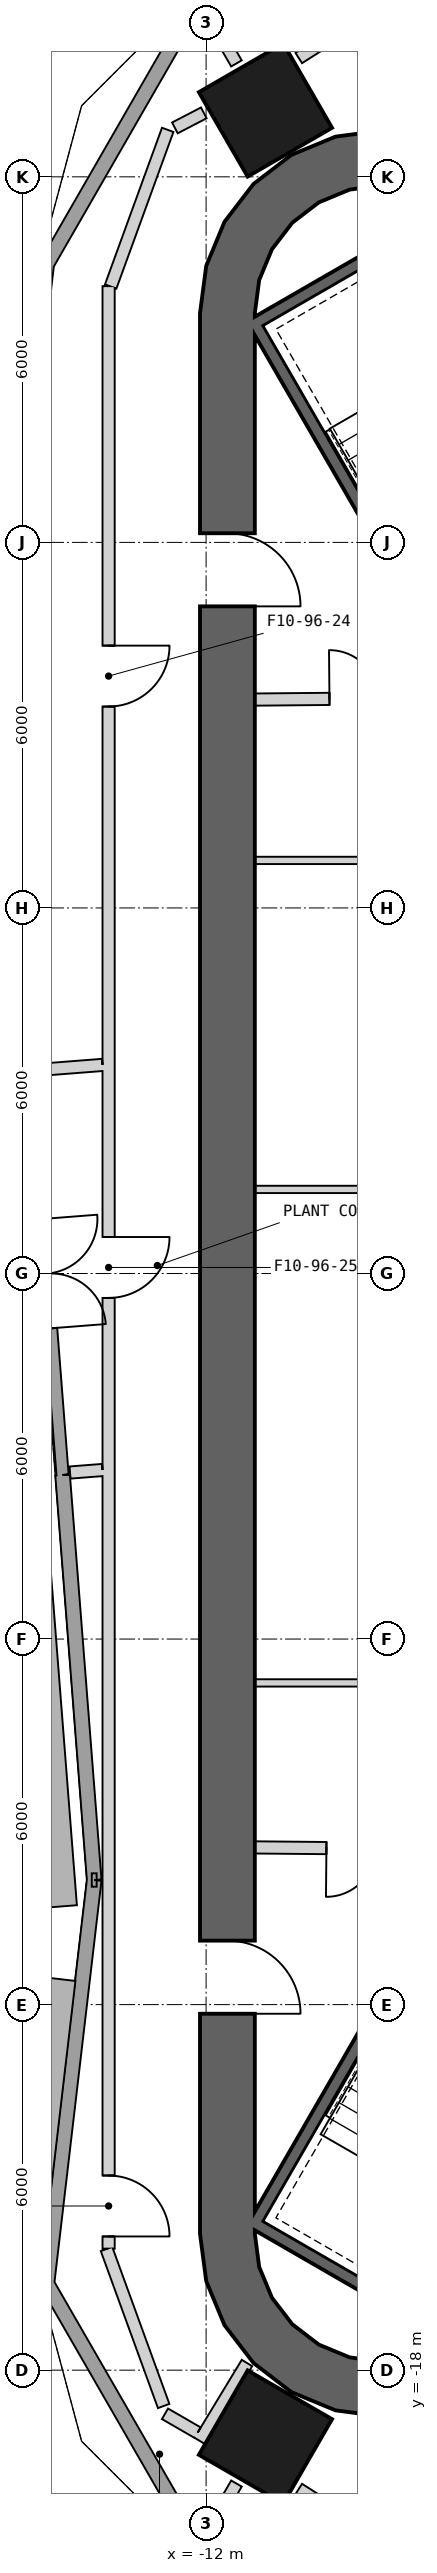
"""IFC4 building model, lengths in metres.
Left out: names, types, materials, properties, quantities, classifications, styles, units other than length and angle.
Written with IfcOpenShell. Run it as: python <this file> out.ifc"""

import sys

from ifc_helpers import new_model, si_unit, direction, frame, frame_2d, origin, origin_2d, place, context, subcontext, project, spatial, polyline, rectangle, outline, extrude, element, fill, save


model = new_model("IFC4")
c1 = context("Model", 3, precision=1e-05, world=origin(), true_north=direction((0.0, 1.0)))
c2 = subcontext(c1, "Body", "Model", "MODEL_VIEW")
j1 = project(units=[si_unit("LENGTHUNIT", "METRE"), si_unit("PLANEANGLEUNIT", "RADIAN")], contexts=[c1])
p1 = place(None, origin())
s1 = spatial("IfcSite", under=j1, at=p1, CompositionType="ELEMENT")
p2 = place(p1, origin())
s2 = spatial("IfcBuilding", under=s1, at=p2, CompositionType="ELEMENT")
p3 = place(p2, frame((0.0, 0.0, 425.3)))
s3 = spatial("IfcBuildingStorey", under=s2, at=p3, CompositionType="ELEMENT", Elevation=425.3)
for number, where, z_axis, x_axis in (
    (1, (-11.025, 19.097, -0.25), (0.0, 0.0, 1.0), (-0.5, 0.866, 0.0)),
    (2, (-11.025, -19.097, -0.25), (0.0, 0.0, 1.0), (-0.5, -0.866, 0.0)),
):
    element("IfcColumn", number, at=place(p3, frame(where, z_axis=z_axis, x_axis=x_axis)), inside=s3, PredefinedType="COLUMN", context=c2, shape_type="SweptSolid", body=[
        extrude(rectangle(XDim=1.6, YDim=1.6, at=origin_2d()), origin(), (0.0, 0.0, 1.0), 5.25),
    ])
p4 = place(p3, frame((-11.65, 15.762, 0.0), z_axis=(0.0, 0.0, 1.0), x_axis=(0.0, -1.0, 0.0)))
e3 = element("IfcWall", 3, at=p4, inside=s3, PredefinedType="SHEAR", context=c2, shape_type="SweptSolid", body=[
    extrude(rectangle(XDim=31.523, YDim=0.9, at=frame_2d((15.762, 0.0))), origin(), (0.0, 0.0, 1.0), 5.0),
])
p5 = place(p4, frame((3.612, 0.0, 0.0)))
e4 = element("IfcOpeningElement", 4, at=p5, cuts=e3, PredefinedType="OPENING", context=c2, shape_type="SweptSolid", body=[
    extrude(rectangle(XDim=1.2, YDim=2.4, at=frame_2d((0.6, 1.2))), frame((0.0, 0.46, 0.0), z_axis=(0.0, -1.0, 0.0), x_axis=(1.0, 0.0, 0.0)), (0.0, 0.0, 1.0), 0.92),
])
p6 = place(p4, frame((26.712, 0.0, 0.0)))
e5 = element("IfcOpeningElement", 5, at=p6, cuts=e3, PredefinedType="OPENING", context=c2, shape_type="SweptSolid", body=[
    extrude(rectangle(XDim=1.2, YDim=2.4, at=frame_2d((0.6, 1.2))), frame((0.0, 0.46, 0.0), z_axis=(0.0, -1.0, 0.0), x_axis=(1.0, 0.0, 0.0)), (0.0, 0.0, 1.0), 0.92),
])
p7 = place(p3, origin())
e6 = element("IfcWall", 6, at=p7, inside=s3, PredefinedType="SHEAR", context=c2, shape_type="SweptSolid", body=[
    extrude(outline(polyline([(-7.6, 18.36), (-8.323, 18.659), (-9.1, 18.762), (-9.876, 18.659), (-10.6, 18.36), (-11.221, 17.883), (-11.698, 17.262), (-11.998, 16.538), (-12.1, 15.762), (-11.2, 15.762), (-11.128, 16.305), (-10.919, 16.812), (-10.585, 17.247), (-10.15, 17.58), (-9.644, 17.79), (-9.1, 17.862), (-8.556, 17.79), (-8.05, 17.58), (-7.6, 18.36)])), origin(), (0.0, 0.0, 1.0), 5.0),
])
p8 = place(p3, origin())
e7 = element("IfcWall", 7, at=p8, inside=s3, PredefinedType="SHEAR", context=c2, shape_type="SweptSolid", body=[
    extrude(outline(polyline([(-12.1, -15.762), (-11.998, -16.538), (-11.698, -17.262), (-11.221, -17.883), (-10.6, -18.36), (-9.876, -18.659), (-9.1, -18.762), (-8.323, -18.659), (-7.6, -18.36), (-8.05, -17.58), (-8.556, -17.79), (-9.1, -17.862), (-9.644, -17.79), (-10.15, -17.58), (-10.585, -17.247), (-10.919, -16.812), (-11.128, -16.305), (-11.2, -15.762), (-12.1, -15.762)])), origin(), (0.0, 0.0, 1.0), 5.0),
])
p9 = place(p3, frame((-12.094, 20.946, 0.0), z_axis=(0.0, 0.0, 1.0), x_axis=(-0.498950155725, -0.866630683799, 0.0)))
e8 = element("IfcWall", 8, at=p9, inside=s3, PredefinedType="SOLIDWALL", context=c2, shape_type="SweptSolid", body=[
    extrude(rectangle(XDim=5.055, YDim=0.24, at=frame_2d((2.527, 0.0))), origin(), (0.0, 0.0, 1.0), 4.75),
])
p10 = place(p3, frame((-14.616, 16.565, 0.0), z_axis=(0.0, 0.0, 1.0), x_axis=(-0.11631164826, -0.993212766973, 0.0)))
e9 = element("IfcWall", 9, at=p10, inside=s3, PredefinedType="SOLIDWALL", context=c2, shape_type="SweptSolid", body=[
    extrude(rectangle(XDim=6.66, YDim=0.24, at=frame_2d((3.33, 0.0))), origin(), (0.0, 0.0, 1.0), 4.75),
])
p11 = place(p3, frame((-14.355, -3.307, 0.0), z_axis=(0.0, 0.0, 1.0), x_axis=(0.07783308516, -0.996966404075, 0.0)))
e10 = element("IfcWall", 10, at=p11, inside=s3, PredefinedType="SOLIDWALL", context=c2, shape_type="SweptSolid", body=[
    extrude(rectangle(XDim=6.669, YDim=0.24, at=frame_2d((3.334, 0.0))), origin(), (0.0, 0.0, 1.0), 4.75),
])
p12 = place(p3, frame((-13.836, -9.955, 0.0), z_axis=(0.0, 0.0, 1.0), x_axis=(-0.116299625297, -0.993214174867, 0.0)))
e11 = element("IfcWall", 11, at=p12, inside=s3, PredefinedType="SOLIDWALL", context=c2, shape_type="SweptSolid", body=[
    extrude(rectangle(XDim=6.669, YDim=0.24, at=frame_2d((3.334, 0.0))), origin(), (0.0, 0.0, 1.0), 4.75),
])
p13 = place(p3, frame((-14.612, -16.579, 0.0), z_axis=(0.0, 0.0, 1.0), x_axis=(0.499577110492, -0.866269421527, 0.0)))
e12 = element("IfcWall", 12, at=p13, inside=s3, PredefinedType="SOLIDWALL", context=c2, shape_type="SweptSolid", body=[
    extrude(rectangle(XDim=5.041, YDim=0.24, at=frame_2d((2.521, 0.0))), origin(), (0.0, 0.0, 1.0), 4.75),
])
p14 = place(p3, frame((-14.871, 3.302, 0.0), z_axis=(0.0, 0.0, 1.0), x_axis=(0.07782303262, -0.996967188825, 0.0)))
e13 = element("IfcWall", 13, at=p14, inside=s3, PredefinedType="SOLIDWALL", context=c2, shape_type="SweptSolid", body=[
    extrude(rectangle(XDim=6.629, YDim=0.2, at=frame_2d((3.314, 0.0))), origin(), (0.0, 0.0, 1.0), 4.75),
])
p15 = place(p14, frame((2.414, 0.0, 0.0)))
e14 = element("IfcOpeningElement", 14, at=p15, cuts=e13, PredefinedType="OPENING", context=c2, shape_type="SweptSolid", body=[
    extrude(rectangle(XDim=1.8, YDim=2.4, at=frame_2d((0.9, 1.2))), frame((0.0, 0.11, 0.0), z_axis=(0.0, -1.0, 0.0), x_axis=(1.0, 0.0, 0.0)), (0.0, 0.0, 1.0), 0.22),
])
p16 = place(p3, frame((-15.098, -17.603, 0.04), z_axis=(0.0, 0.0, 1.0), x_axis=(0.116308472351, 0.993213138888, 0.0)))
e15 = element("IfcWall", 15, at=p16, inside=s3, PredefinedType="PARAPET", context=c2, shape_type="SweptSolid", body=[
    extrude(rectangle(XDim=6.062, YDim=0.5, at=frame_2d((3.031, 0.0))), origin(), (0.0, 0.0, 1.0), 0.6),
])
p17 = place(p3, frame((-14.37, -10.388, 0.04), z_axis=(0.0, 0.0, 1.0), x_axis=(-0.077848108656, 0.996965231078, 0.0)))
e16 = element("IfcWall", 16, at=p17, inside=s3, PredefinedType="PARAPET", context=c2, shape_type="SweptSolid", body=[
    extrude(rectangle(XDim=20.799, YDim=0.5, at=frame_2d((10.399, 0.0))), origin(), (0.0, 0.0, 1.0), 0.6),
])
p18 = place(p3, frame((-11.245, 15.678, -0.25), z_axis=(0.0, 0.0, 1.0), x_axis=(0.499977274689, -0.866038523851, 0.0)))
e17 = element("IfcWall", 17, at=p18, inside=s3, PredefinedType="SHEAR", context=c2, shape_type="SweptSolid", body=[
    extrude(rectangle(XDim=8.1, YDim=0.2, at=frame_2d((4.05, 0.0))), origin(), (0.0, 0.0, 1.0), 5.0),
])
for number, where, z_axis, x_axis in (
    (18, (-7.818, 17.541, -0.25), (0.0, 0.0, 1.0), (-0.866, -0.5, 0.0)),
    (19, (-11.282, -15.541, -0.25), (0.0, 0.0, 1.0), (0.866, -0.5, 0.0)),
):
    element("IfcWall", number, at=place(p3, frame(where, z_axis=z_axis, x_axis=x_axis)), inside=s3, PredefinedType="SHEAR", context=c2, shape_type="SweptSolid", body=[
        extrude(rectangle(XDim=3.8, YDim=0.2, at=frame_2d((1.9, 0.0))), origin(), (0.0, 0.0, 1.0), 5.0),
    ])
p19 = place(p3, frame((-7.196, -8.663, -0.25), z_axis=(0.0, 0.0, 1.0), x_axis=(-0.499997992926, -0.866026562566, 0.0)))
e20 = element("IfcWall", 20, at=p19, inside=s3, PredefinedType="SHEAR", context=c2, shape_type="SweptSolid", body=[
    extrude(rectangle(XDim=7.9, YDim=0.2, at=frame_2d((3.95, 0.0))), origin(), (0.0, 0.0, 1.0), 5.0),
])
p20 = place(p3, frame((-7.95, 6.78, 0.0), z_axis=(0.0, 0.0, 1.0), x_axis=(-1.0, 0.0, 0.0)))
e21 = element("IfcWall", 21, at=p20, inside=s3, PredefinedType="PARTITIONING", context=c2, shape_type="SweptSolid", body=[
    extrude(rectangle(XDim=3.25, YDim=0.12, at=frame_2d((1.625, 0.0))), origin(), (0.0, 0.0, 1.0), 4.75),
])
p21 = place(p3, frame((-7.85, 9.451, 0.0), z_axis=(0.0, 0.0, 1.0), x_axis=(-0.999957167047, -0.009255488683, 0.0)))
e22 = element("IfcWall", 22, at=p21, inside=s3, PredefinedType="PARTITIONING", context=c2, shape_type="SweptSolid", body=[
    extrude(rectangle(XDim=3.35, YDim=0.2, at=frame_2d((1.675, 0.0))), origin(), (0.0, 0.0, 1.0), 4.75),
])
p22 = place(p21, frame((1.325, 0.0, 0.0)))
e23 = element("IfcOpeningElement", 23, at=p22, cuts=e22, PredefinedType="OPENING", context=c2, shape_type="SweptSolid", body=[
    extrude(rectangle(XDim=0.8, YDim=2.1, at=frame_2d((0.4, 1.05))), frame((0.0, 0.11, 0.0), z_axis=(0.0, -1.0, 0.0), x_axis=(1.0, 0.0, 0.0)), (0.0, 0.0, 1.0), 0.22),
])
for number, where, z_axis, x_axis in (
    (24, (-7.95, 1.38, 0.0), (0.0, 0.0, 1.0), (-1.0, 0.0, 0.0)),
    (25, (-11.2, -6.72, 0.0), (0.0, 0.0, 1.0), (1.0, 0.0, 0.0)),
):
    element("IfcWall", number, at=place(p3, frame(where, z_axis=z_axis, x_axis=x_axis)), inside=s3, PredefinedType="PARTITIONING", context=c2, shape_type="SweptSolid", body=[
        extrude(rectangle(XDim=3.25, YDim=0.12, at=frame_2d((1.625, 0.0))), origin(), (0.0, 0.0, 1.0), 4.75),
    ])
p23 = place(p3, frame((-11.2, -9.42, 0.0), z_axis=(0.0, 0.0, 1.0), x_axis=(0.999957467379, -0.009222983926, 0.0)))
e26 = element("IfcWall", 26, at=p23, inside=s3, PredefinedType="PARTITIONING", context=c2, shape_type="SweptSolid", body=[
    extrude(rectangle(XDim=3.15, YDim=0.2, at=frame_2d((1.575, 0.0))), origin(), (0.0, 0.0, 1.0), 4.75),
])
p24 = place(p23, frame((1.175, 0.0, 0.0)))
e27 = element("IfcOpeningElement", 27, at=p24, cuts=e26, PredefinedType="OPENING", context=c2, shape_type="SweptSolid", body=[
    extrude(rectangle(XDim=0.8, YDim=2.1, at=frame_2d((0.4, 1.05))), frame((0.0, 0.11, 0.0), z_axis=(0.0, -1.0, 0.0), x_axis=(1.0, 0.0, 0.0)), (0.0, 0.0, 1.0), 0.22),
])
p25 = place(p3, frame((-13.6, 16.206, 0.0), z_axis=(0.0, 0.0, 1.0), x_axis=(0.0, -1.0, 0.0)))
e28 = element("IfcWall", 28, at=p25, inside=s3, PredefinedType="PARTITIONING", context=c2, shape_type="SweptSolid", body=[
    extrude(rectangle(XDim=12.75, YDim=0.2, at=frame_2d((6.375, 0.0))), origin(), (0.0, 0.0, 1.0), 4.75),
])
p26 = place(p25, frame((5.9, 0.0, 0.0)))
e29 = element("IfcOpeningElement", 29, at=p26, cuts=e28, PredefinedType="OPENING", context=c2, shape_type="SweptSolid", body=[
    extrude(rectangle(XDim=1.0, YDim=2.1, at=frame_2d((0.5, 1.05))), frame((0.0, 0.11, 0.0), z_axis=(0.0, -1.0, 0.0), x_axis=(1.0, 0.0, 0.0)), (0.0, 0.0, 1.0), 0.22),
])
p27 = place(p3, frame((-13.6, 3.455, 0.0), z_axis=(0.0, 0.0, 1.0), x_axis=(0.0, -1.0, 0.0)))
e30 = element("IfcWall", 30, at=p27, inside=s3, PredefinedType="PARTITIONING", context=c2, shape_type="SweptSolid", body=[
    extrude(rectangle(XDim=6.649, YDim=0.2, at=frame_2d((3.324, 0.0))), origin(), (0.0, 0.0, 1.0), 4.75),
])
p28 = place(p27, frame((2.856, 0.0, 0.0)))
e31 = element("IfcOpeningElement", 31, at=p28, cuts=e30, PredefinedType="OPENING", context=c2, shape_type="SweptSolid", body=[
    extrude(rectangle(XDim=1.0, YDim=2.1, at=frame_2d((0.5, 1.05))), frame((0.0, 0.11, 0.0), z_axis=(0.0, -1.0, 0.0), x_axis=(1.0, 0.0, 0.0)), (0.0, 0.0, 1.0), 0.22),
])
p29 = place(p3, frame((-13.6, -3.194, 0.0), z_axis=(0.0, 0.0, 1.0), x_axis=(0.0, -1.0, 0.0)))
e32 = element("IfcWall", 32, at=p29, inside=s3, PredefinedType="PARTITIONING", context=c2, shape_type="SweptSolid", body=[
    extrude(rectangle(XDim=12.812, YDim=0.2, at=frame_2d((6.406, 0.0))), origin(), (0.0, 0.0, 1.0), 4.75),
])
p30 = place(p29, frame((11.612, 0.0, 0.0)))
e33 = element("IfcOpeningElement", 33, at=p30, cuts=e32, PredefinedType="OPENING", context=c2, shape_type="SweptSolid", body=[
    extrude(rectangle(XDim=1.0, YDim=2.1, at=frame_2d((0.5, 1.05))), frame((0.0, 0.11, 0.0), z_axis=(0.0, -1.0, 0.0), x_axis=(1.0, 0.0, 0.0)), (0.0, 0.0, 1.0), 0.22),
])
p31 = place(p3, frame((-12.63, 18.771, 0.0), z_axis=(0.0, 0.0, 1.0), x_axis=(-0.342015224264, -0.939694411163, 0.0)))
e34 = element("IfcWall", 34, at=p31, inside=s3, PredefinedType="PARTITIONING", context=c2, shape_type="SweptSolid", body=[
    extrude(rectangle(XDim=2.737, YDim=0.2, at=frame_2d((1.368, 0.0))), origin(), (0.0, 0.0, 1.0), 4.75),
])
p32 = place(p3, frame((-12.038, 19.05, 0.0), z_axis=(0.0, 0.0, 1.0), x_axis=(-0.887186880255, -0.461410272429, 0.0)))
e35 = element("IfcWall", 35, at=p32, inside=s3, PredefinedType="PARTITIONING", context=c2, shape_type="SweptSolid", body=[
    extrude(rectangle(XDim=0.534, YDim=0.2, at=frame_2d((0.267, 0.0))), origin(), (0.0, 0.0, 1.0), 4.75),
])
p33 = place(p3, frame((-12.104, -19.161, 0.0), z_axis=(0.0, 0.0, 1.0), x_axis=(0.518475368733, 0.855092563421, 0.0)))
e36 = element("IfcWall", 36, at=p33, inside=s3, PredefinedType="PARTITIONING", context=c2, shape_type="SweptSolid", body=[
    extrude(rectangle(XDim=1.496, YDim=0.2, at=frame_2d((0.748, 0.0))), origin(), (0.0, 0.0, 1.0), 4.75),
])
p34 = place(p3, frame((-12.675, -18.717, 0.0), z_axis=(0.0, 0.0, 1.0), x_axis=(0.866047486323, -0.49996174997, 0.0)))
e37 = element("IfcWall", 37, at=p34, inside=s3, PredefinedType="PARTITIONING", context=c2, shape_type="SweptSolid", body=[
    extrude(rectangle(XDim=0.618, YDim=0.2, at=frame_2d((0.309, 0.0))), origin(), (0.0, 0.0, 1.0), 4.75),
])
p35 = place(p3, frame((-13.634, -16.011, 0.0), z_axis=(0.0, 0.0, 1.0), x_axis=(0.342043269434, -0.939684203248, 0.0)))
e38 = element("IfcWall", 38, at=p35, inside=s3, PredefinedType="PARTITIONING", context=c2, shape_type="SweptSolid", body=[
    extrude(rectangle(XDim=2.742, YDim=0.2, at=frame_2d((1.371, 0.0))), origin(), (0.0, 0.0, 1.0), 4.75),
])
p36 = place(p3, frame((-14.749, 3.342, 0.0), z_axis=(0.0, 0.0, 1.0), x_axis=(0.996974795891, 0.077725519345, 0.0)))
e39 = element("IfcWall", 39, at=p36, inside=s3, PredefinedType="PARTITIONING", context=c2, shape_type="SweptSolid", body=[
    extrude(rectangle(XDim=1.052, YDim=0.2, at=frame_2d((0.526, 0.0))), origin(), (0.0, 0.0, 1.0), 4.75),
])
p37 = place(p3, frame((-11.501, 19.861, 0.0), z_axis=(0.0, 0.0, 1.0), x_axis=(-0.500107244371, 0.865963477364, 0.0)))
e40 = element("IfcWall", 40, at=p37, inside=s3, PredefinedType="PARTITIONING", context=c2, shape_type="SweptSolid", body=[
    extrude(rectangle(XDim=1.098, YDim=0.2, at=frame_2d((0.549, 0.0))), origin(), (0.0, 0.0, 1.0), 3.93),
])
p38 = place(p3, frame((-13.7, -3.226, 0.0), z_axis=(0.0, 0.0, 1.0), x_axis=(-0.996984255574, -0.077604085828, 0.0)))
e41 = element("IfcWall", 41, at=p38, inside=s3, PredefinedType="PARTITIONING", context=c2, shape_type="SweptSolid", body=[
    extrude(rectangle(XDim=0.535, YDim=0.2, at=frame_2d((0.268, 0.0))), origin(), (0.0, 0.0, 1.0), 4.75),
])
p39 = place(p3, frame((-11.501, -19.861, 0.0), z_axis=(0.0, 0.0, 1.0), x_axis=(-0.500107244371, -0.865963477364, 0.0)))
e42 = element("IfcWall", 42, at=p39, inside=s3, PredefinedType="PARTITIONING", context=c2, shape_type="SweptSolid", body=[
    extrude(rectangle(XDim=1.098, YDim=0.2, at=frame_2d((0.549, 0.0))), origin(), (0.0, 0.0, 1.0), 3.93),
])
p40 = place(p3, frame((-9.87, 20.337, 0.0), z_axis=(0.0, 0.0, 1.0), x_axis=(-0.843326891705, -0.537400924569, 0.0)))
e43 = element("IfcWall", 43, at=p40, inside=s3, PredefinedType="PARTITIONING", context=c2, shape_type="SweptSolid", body=[
    extrude(rectangle(XDim=0.721, YDim=0.2, at=frame_2d((0.361, 0.0))), origin(), (0.0, 0.0, 1.0), 4.75),
])
p41 = place(p3, frame((-7.049, 19.813, 0.0), z_axis=(0.0, 0.0, 1.0), x_axis=(-0.984805002764, 0.173663774378, 0.0)))
e44 = element("IfcWall", 44, at=p41, inside=s3, PredefinedType="PARTITIONING", context=c2, shape_type="SweptSolid", body=[
    extrude(rectangle(XDim=2.75, YDim=0.2, at=frame_2d((1.375, 0.0))), origin(), (0.0, 0.0, 1.0), 4.75),
])
p42 = place(p3, frame((-9.941, -20.323, 0.0), z_axis=(0.0, 0.0, 1.0), x_axis=(0.984814976585, 0.173607205765, 0.0)))
e45 = element("IfcWall", 45, at=p42, inside=s3, PredefinedType="PARTITIONING", context=c2, shape_type="SweptSolid", body=[
    extrude(rectangle(XDim=2.737, YDim=0.2, at=frame_2d((1.368, 0.0))), origin(), (0.0, 0.0, 1.0), 4.75),
])
p43 = place(p3, frame((-10.479, -19.95, 0.0), z_axis=(0.0, 0.0, 1.0), x_axis=(0.84332290589, -0.537407179335, 0.0)))
e46 = element("IfcWall", 46, at=p43, inside=s3, PredefinedType="PARTITIONING", context=c2, shape_type="SweptSolid", body=[
    extrude(rectangle(XDim=0.535, YDim=0.2, at=frame_2d((0.267, 0.0))), origin(), (0.0, 0.0, 1.0), 4.75),
])
p44 = place(p15, frame((1.8, 0.0, 0.0), z_axis=(0.0, 0.0, 1.0), x_axis=(-1.0, 0.0, 0.0)))
e47 = element("IfcDoor", 47, at=p44, inside=s3, OperationType="SINGLE_SWING_RIGHT", PredefinedType="DOOR", context=c2, shape_type="SweptSolid", body=[
    extrude(rectangle(XDim=1.8, YDim=2.4, at=frame_2d((0.9, 1.2))), frame((0.0, 0.025, 0.0), z_axis=(0.0, -1.0, 0.0), x_axis=(1.0, 0.0, 0.0)), (0.0, 0.0, 1.0), 0.05),
])
fill(e14, e47)
p45 = place(p22, origin())
e48 = element("IfcDoor", 48, at=p45, inside=s3, OperationType="SINGLE_SWING_RIGHT", PredefinedType="USERDEFINED", context=c2, shape_type="SweptSolid", body=[
    extrude(rectangle(XDim=0.8, YDim=2.1, at=frame_2d((0.4, 1.05))), frame((0.0, 0.025, 0.0), z_axis=(0.0, -1.0, 0.0), x_axis=(1.0, 0.0, 0.0)), (0.0, 0.0, 1.0), 0.05),
])
fill(e23, e48)
p46 = place(p24, origin())
e49 = element("IfcDoor", 49, at=p46, inside=s3, OperationType="SINGLE_SWING_LEFT", PredefinedType="USERDEFINED", context=c2, shape_type="SweptSolid", body=[
    extrude(rectangle(XDim=0.8, YDim=2.1, at=frame_2d((0.4, 1.05))), frame((0.0, 0.025, 0.0), z_axis=(0.0, -1.0, 0.0), x_axis=(1.0, 0.0, 0.0)), (0.0, 0.0, 1.0), 0.05),
])
fill(e27, e49)
p47 = place(p26, origin())
e50 = element("IfcDoor", 50, at=p47, inside=s3, OperationType="SINGLE_SWING_LEFT", PredefinedType="USERDEFINED", context=c2, shape_type="SweptSolid", body=[
    extrude(rectangle(XDim=1.0, YDim=2.1, at=frame_2d((0.5, 1.05))), frame((0.0, 0.025, 0.0), z_axis=(0.0, -1.0, 0.0), x_axis=(1.0, 0.0, 0.0)), (0.0, 0.0, 1.0), 0.05),
])
fill(e29, e50)
p48 = place(p28, origin())
e51 = element("IfcDoor", 51, at=p48, inside=s3, OperationType="SINGLE_SWING_LEFT", PredefinedType="USERDEFINED", context=c2, shape_type="SweptSolid", body=[
    extrude(rectangle(XDim=1.0, YDim=2.1, at=frame_2d((0.5, 1.05))), frame((0.0, 0.025, 0.0), z_axis=(0.0, -1.0, 0.0), x_axis=(1.0, 0.0, 0.0)), (0.0, 0.0, 1.0), 0.05),
])
fill(e31, e51)
p49 = place(p30, origin())
e52 = element("IfcDoor", 52, at=p49, inside=s3, OperationType="SINGLE_SWING_RIGHT", PredefinedType="USERDEFINED", context=c2, shape_type="SweptSolid", body=[
    extrude(rectangle(XDim=1.0, YDim=2.1, at=frame_2d((0.5, 1.05))), frame((0.0, 0.025, 0.0), z_axis=(0.0, -1.0, 0.0), x_axis=(1.0, 0.0, 0.0)), (0.0, 0.0, 1.0), 0.05),
])
fill(e33, e52)
p50 = place(p5, origin())
e53 = element("IfcDoor", 53, at=p50, inside=s3, OperationType="SINGLE_SWING_RIGHT", PredefinedType="USERDEFINED", context=c2, shape_type="SweptSolid", body=[
    extrude(rectangle(XDim=1.2, YDim=2.4, at=frame_2d((0.6, 1.2))), frame((0.0, 0.025, 0.0), z_axis=(0.0, -1.0, 0.0), x_axis=(1.0, 0.0, 0.0)), (0.0, 0.0, 1.0), 0.05),
])
fill(e4, e53)
p51 = place(p6, origin())
e54 = element("IfcDoor", 54, at=p51, inside=s3, OperationType="SINGLE_SWING_RIGHT", PredefinedType="USERDEFINED", context=c2, shape_type="SweptSolid", body=[
    extrude(rectangle(XDim=1.2, YDim=2.4, at=frame_2d((0.6, 1.2))), frame((0.0, 0.025, 0.0), z_axis=(0.0, -1.0, 0.0), x_axis=(1.0, 0.0, 0.0)), (0.0, 0.0, 1.0), 0.05),
])
fill(e5, e54)
save(model, sys.argv[1])
